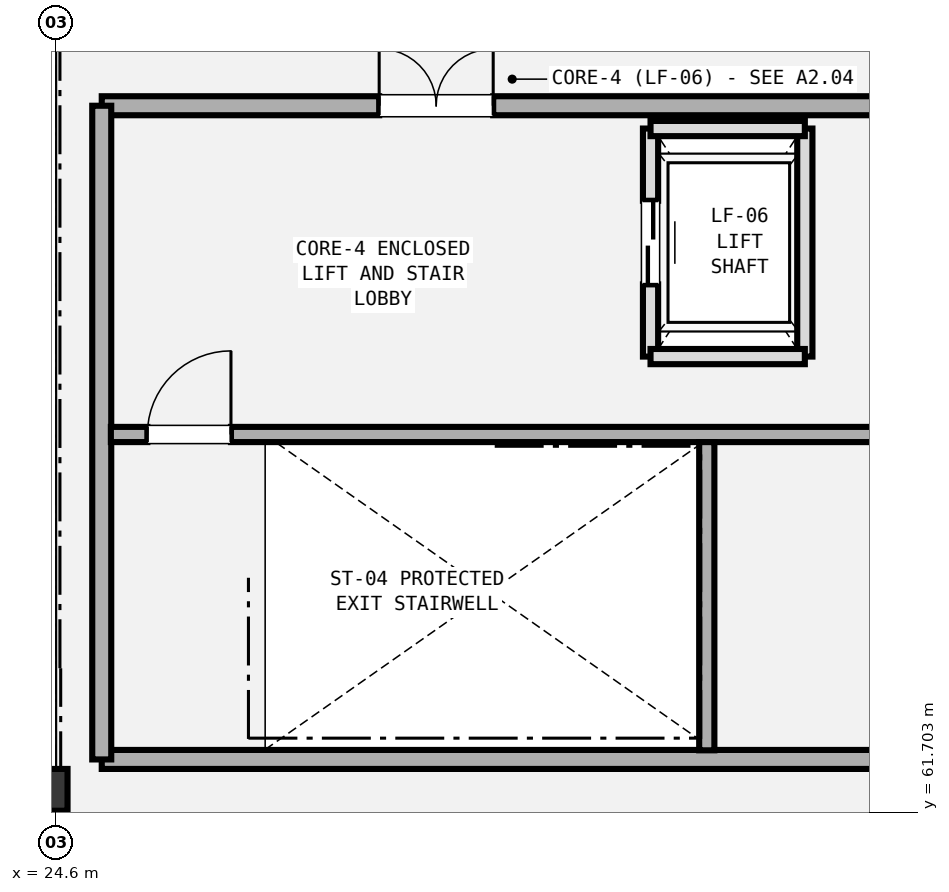
"""IFC4 building model, lengths in metres.
Left out: names, types, materials, properties, quantities, classifications, styles, units other than length and angle.
Written with IfcOpenShell. Run it as: python <this file> out.ifc"""

import sys

from ifc_helpers import new_model, si_unit, direction, frame, frame_2d, origin, origin_2d, place, context, subcontext, project, spatial, rectangle, i_section, extrude, element, fill, save


model = new_model("IFC4")
c1 = context("Model", 3, precision=1e-05, world=origin(), true_north=direction((0.0, 1.0)))
c2 = subcontext(c1, "Body", "Model", "MODEL_VIEW")
j1 = project(units=[si_unit("LENGTHUNIT", "METRE"), si_unit("PLANEANGLEUNIT", "RADIAN")], contexts=[c1])
p1 = place(None, origin())
s1 = spatial("IfcSite", under=j1, at=p1, CompositionType="ELEMENT")
p2 = place(p1, origin())
s2 = spatial("IfcBuilding", under=s1, at=p2, CompositionType="ELEMENT")
p3 = place(p2, frame((0.0, 0.0, 9.6)))
s3 = spatial("IfcBuildingStorey", under=s2, at=p3, CompositionType="ELEMENT", Elevation=9.6)
p4 = place(p3, frame((24.6, 62.0, 0.0), z_axis=(0.0, 0.0, 1.0), x_axis=(1.0, 0.0, 0.0)))
e1 = element("IfcColumn", 1, at=p4, inside=s3, PredefinedType="COLUMN", context=c2, shape_type="SweptSolid", body=[
    extrude(i_section(OverallWidth=0.3, OverallDepth=0.55, WebThickness=0.015, FlangeThickness=0.029, FilletRadius=0.027, at=origin_2d()), origin(), (0.0, 0.0, 1.0), 4.8),
])
p5 = place(p3, frame((25.2, 62.4, 0.0), z_axis=(0.0, 0.0, 1.0), x_axis=(1.0, 0.0, 0.0)))
e2 = element("IfcWall", 2, at=p5, inside=s3, PredefinedType="SHEAR", context=c2, shape_type="SweptSolid", body=[
    extrude(rectangle(XDim=10.8, YDim=0.25, at=frame_2d((5.4, 0.0))), origin(), (0.0, 0.0, 1.0), 3.95),
])
p6 = place(p3, frame((25.2, 71.0, 0.0), z_axis=(0.0, 0.0, 1.0), x_axis=(1.0, 0.0, 0.0)))
e3 = element("IfcWall", 3, at=p6, inside=s3, PredefinedType="SHEAR", context=c2, shape_type="SweptSolid", body=[
    extrude(rectangle(XDim=10.8, YDim=0.25, at=frame_2d((5.4, 0.0))), origin(), (0.0, 0.0, 1.0), 3.95),
])
p7 = place(p6, frame((3.65, 0.0, 0.0)))
e4 = element("IfcOpeningElement", 4, at=p7, cuts=e3, PredefinedType="OPENING", context=c2, shape_type="SweptSolid", body=[
    extrude(rectangle(XDim=1.5, YDim=2.0, at=frame_2d((0.75, 1.0))), frame((0.0, 0.135, 0.0), z_axis=(0.0, -1.0, 0.0), x_axis=(1.0, 0.0, 0.0)), (0.0, 0.0, 1.0), 0.27),
])
p8 = place(p3, frame((25.2, 62.4, 0.0), z_axis=(0.0, 0.0, 1.0), x_axis=(0.0, 1.0, 0.0)))
e5 = element("IfcWall", 5, at=p8, inside=s3, PredefinedType="SHEAR", context=c2, shape_type="SweptSolid", body=[
    extrude(rectangle(XDim=8.6, YDim=0.25, at=frame_2d((4.3, 0.0))), origin(), (0.0, 0.0, 1.0), 3.95),
])
p9 = place(p3, frame((25.32, 66.675, 0.0), z_axis=(0.0, 0.0, 1.0), x_axis=(1.0, 0.0, 0.0)))
e6 = element("IfcWall", 6, at=p9, inside=s3, PredefinedType="SHEAR", context=c2, shape_type="SweptSolid", body=[
    extrude(rectangle(XDim=10.56, YDim=0.2, at=frame_2d((5.28, 0.0))), origin(), (0.0, 0.0, 1.0), 3.95),
])
p10 = place(p9, frame((0.48, 0.0, 0.0)))
e7 = element("IfcOpeningElement", 7, at=p10, cuts=e6, PredefinedType="OPENING", context=c2, shape_type="SweptSolid", body=[
    extrude(rectangle(XDim=1.1, YDim=2.0, at=frame_2d((0.55, 1.0))), frame((0.0, 0.11, 0.0), z_axis=(0.0, -1.0, 0.0), x_axis=(1.0, 0.0, 0.0)), (0.0, 0.0, 1.0), 0.22),
])
p11 = place(p3, frame((33.16, 62.52, 0.0), z_axis=(0.0, 0.0, 1.0), x_axis=(0.0, 1.0, 0.0)))
e8 = element("IfcWall", 8, at=p11, inside=s3, PredefinedType="SHEAR", context=c2, shape_type="SweptSolid", body=[
    extrude(rectangle(XDim=4.055, YDim=0.2, at=frame_2d((2.027, 0.0))), origin(), (0.0, 0.0, 1.0), 3.95),
])
p12 = place(p3, frame((32.42, 67.7, 0.0), z_axis=(0.0, 0.0, 1.0), x_axis=(0.0, 1.0, 0.0)))
e9 = element("IfcWall", 9, at=p12, inside=s3, PredefinedType="SOLIDWALL", context=c2, shape_type="SweptSolid", body=[
    extrude(rectangle(XDim=3.0, YDim=0.2, at=frame_2d((1.5, 0.0))), origin(), (0.0, 0.0, 1.0), 3.95),
])
p13 = place(p12, frame((0.95, 0.0, 0.0)))
e10 = element("IfcOpeningElement", 10, at=p13, cuts=e9, PredefinedType="OPENING", context=c2, shape_type="SweptSolid", body=[
    extrude(rectangle(XDim=1.1, YDim=2.2, at=frame_2d((0.55, 1.1))), frame((0.0, 0.11, 0.0), z_axis=(0.0, -1.0, 0.0), x_axis=(1.0, 0.0, 0.0)), (0.0, 0.0, 1.0), 0.22),
])
p14 = place(p3, frame((34.45, 67.7, 0.0), z_axis=(0.0, 0.0, 1.0), x_axis=(0.0, 1.0, 0.0)))
e11 = element("IfcWall", 11, at=p14, inside=s3, PredefinedType="SOLIDWALL", context=c2, shape_type="SweptSolid", body=[
    extrude(rectangle(XDim=3.0, YDim=0.2, at=frame_2d((1.5, 0.0))), origin(), (0.0, 0.0, 1.0), 3.95),
])
for number, where, z_axis, x_axis in (
    (12, (32.42, 67.7, 0.0), (0.0, 0.0, 1.0), (1.0, 0.0, 0.0)),
    (13, (32.42, 70.7, 0.0), (0.0, 0.0, 1.0), (1.0, 0.0, 0.0)),
):
    element("IfcWall", number, at=place(p3, frame(where, z_axis=z_axis, x_axis=x_axis)), inside=s3, PredefinedType="SOLIDWALL", context=c2, shape_type="SweptSolid", body=[
        extrude(rectangle(XDim=2.03, YDim=0.2, at=frame_2d((1.015, 0.0))), origin(), (0.0, 0.0, 1.0), 3.95),
    ])
p15 = place(p7, origin())
e14 = element("IfcDoor", 14, at=p15, inside=s3, OperationType="DOUBLE_DOOR_SINGLE_SWING", PredefinedType="DOOR", context=c2, shape_type="SweptSolid", body=[
    extrude(rectangle(XDim=1.5, YDim=2.0, at=frame_2d((0.75, 1.0))), frame((0.0, 0.025, 0.0), z_axis=(0.0, -1.0, 0.0), x_axis=(1.0, 0.0, 0.0)), (0.0, 0.0, 1.0), 0.05),
])
fill(e4, e14)
p16 = place(p10, origin())
e15 = element("IfcDoor", 15, at=p16, inside=s3, OperationType="SINGLE_SWING_RIGHT", PredefinedType="DOOR", context=c2, shape_type="SweptSolid", body=[
    extrude(rectangle(XDim=1.1, YDim=2.0, at=frame_2d((0.55, 1.0))), frame((0.0, 0.025, 0.0), z_axis=(0.0, -1.0, 0.0), x_axis=(1.0, 0.0, 0.0)), (0.0, 0.0, 1.0), 0.05),
])
fill(e7, e15)
p17 = place(p13, origin())
e16 = element("IfcDoor", 16, at=p17, inside=s3, OperationType="DOUBLE_DOOR_SLIDING", PredefinedType="DOOR", context=c2, shape_type="SweptSolid", body=[
    extrude(rectangle(XDim=1.1, YDim=2.2, at=frame_2d((0.55, 1.1))), frame((0.0, 0.025, 0.0), z_axis=(0.0, -1.0, 0.0), x_axis=(1.0, 0.0, 0.0)), (0.0, 0.0, 1.0), 0.05),
])
fill(e10, e16)
save(model, sys.argv[1])
